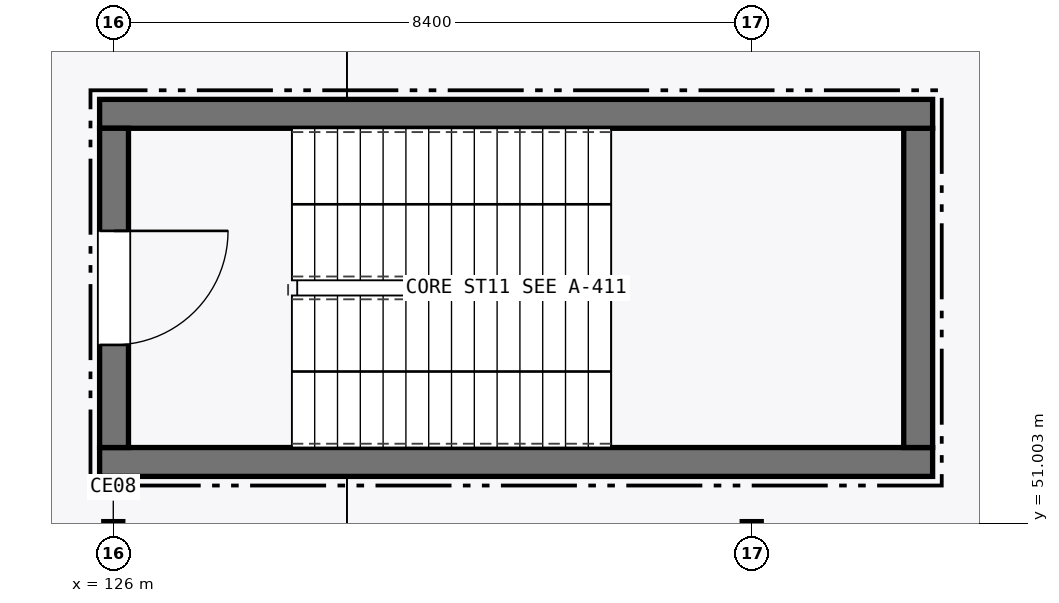
"""IFC4 building model, lengths in metres.
Left out: names, types, materials, properties, quantities, classifications, styles, units other than length and angle.
Written with IfcOpenShell. Run it as: python <this file> out.ifc"""

import sys

from ifc_helpers import new_model, si_unit, direction, frame, frame_2d, origin, origin_2d, place, context, subcontext, project, spatial, rectangle, i_section, extrude, element, fill, save


model = new_model("IFC4")
c1 = context("Model", 3, precision=1e-05, world=origin(), true_north=direction((0.0, 1.0)))
c2 = subcontext(c1, "Body", "Model", "MODEL_VIEW")
j1 = project(units=[si_unit("LENGTHUNIT", "METRE"), si_unit("PLANEANGLEUNIT", "RADIAN")], contexts=[c1])
p1 = place(None, origin())
s1 = spatial("IfcSite", under=j1, at=p1, CompositionType="ELEMENT")
p2 = place(p1, origin())
s2 = spatial("IfcBuilding", under=s1, at=p2, CompositionType="ELEMENT")
p3 = place(p2, frame((0.0, 0.0, 31.8)))
s3 = spatial("IfcBuildingStorey", under=s2, at=p3, CompositionType="ELEMENT", Elevation=31.8)
for number, where, z_axis, x_axis in (
    (1, (126.0, 50.9, 0.0), (0.0, 0.0, 1.0), (1.0, 0.0, 0.0)),
    (2, (134.4, 50.9, 0.0), (0.0, 0.0, 1.0), (1.0, 0.0, 0.0)),
):
    element("IfcColumn", number, at=place(p3, frame(where, z_axis=z_axis, x_axis=x_axis)), inside=s3, PredefinedType="COLUMN", context=c2, shape_type="SweptSolid", body=[
        extrude(i_section(OverallWidth=0.25, OverallDepth=0.25, WebThickness=0.009, FlangeThickness=0.014, FilletRadius=0.016, at=origin_2d()), origin(), (0.0, 0.0, 1.0), 4.5),
    ])
p4 = place(p3, frame((125.82, 51.81, 0.0), z_axis=(0.0, 0.0, 1.0), x_axis=(1.0, 0.0, 0.0)))
e3 = element("IfcWall", 3, at=p4, inside=s3, PredefinedType="SHEAR", context=c2, shape_type="SweptSolid", body=[
    extrude(rectangle(XDim=10.96, YDim=0.38, at=frame_2d((5.48, 0.0))), origin(), (0.0, 0.0, 1.0), 4.245),
])
p5 = place(p3, frame((136.59, 52.0, 0.0), z_axis=(0.0, 0.0, 1.0), x_axis=(0.0, 1.0, 0.0)))
e4 = element("IfcWall", 4, at=p5, inside=s3, PredefinedType="SHEAR", context=c2, shape_type="SweptSolid", body=[
    extrude(rectangle(XDim=4.2, YDim=0.38, at=frame_2d((2.1, 0.0))), origin(), (0.0, 0.0, 1.0), 4.245),
])
p6 = place(p3, frame((136.78, 56.39, 0.0), z_axis=(0.0, 0.0, 1.0), x_axis=(-1.0, 0.0, 0.0)))
e5 = element("IfcWall", 5, at=p6, inside=s3, PredefinedType="SHEAR", context=c2, shape_type="SweptSolid", body=[
    extrude(rectangle(XDim=10.96, YDim=0.38, at=frame_2d((5.48, 0.0))), origin(), (0.0, 0.0, 1.0), 4.245),
])
p7 = place(p3, frame((126.01, 56.2, 0.0), z_axis=(0.0, 0.0, 1.0), x_axis=(0.0, -1.0, 0.0)))
e6 = element("IfcWall", 6, at=p7, inside=s3, PredefinedType="SHEAR", context=c2, shape_type="SweptSolid", body=[
    extrude(rectangle(XDim=4.2, YDim=0.38, at=frame_2d((2.1, 0.0))), origin(), (0.0, 0.0, 1.0), 4.245),
])
p8 = place(p7, frame((1.35, 0.0, 0.0)))
e7 = element("IfcOpeningElement", 7, at=p8, cuts=e6, PredefinedType="OPENING", context=c2, shape_type="SweptSolid", body=[
    extrude(rectangle(XDim=1.5, YDim=2.15, at=frame_2d((0.75, 1.075))), frame((0.0, 0.2, 0.0), z_axis=(0.0, -1.0, 0.0), x_axis=(1.0, 0.0, 0.0)), (0.0, 0.0, 1.0), 0.4),
])
p9 = place(p8, origin())
e8 = element("IfcDoor", 8, at=p9, inside=s3, OperationType="SINGLE_SWING_LEFT", PredefinedType="DOOR", context=c2, shape_type="SweptSolid", body=[
    extrude(rectangle(XDim=1.5, YDim=2.15, at=frame_2d((0.75, 1.075))), frame((0.0, 0.025, 0.0), z_axis=(0.0, -1.0, 0.0), x_axis=(1.0, 0.0, 0.0)), (0.0, 0.0, 1.0), 0.05),
])
fill(e7, e8)
save(model, sys.argv[1])
